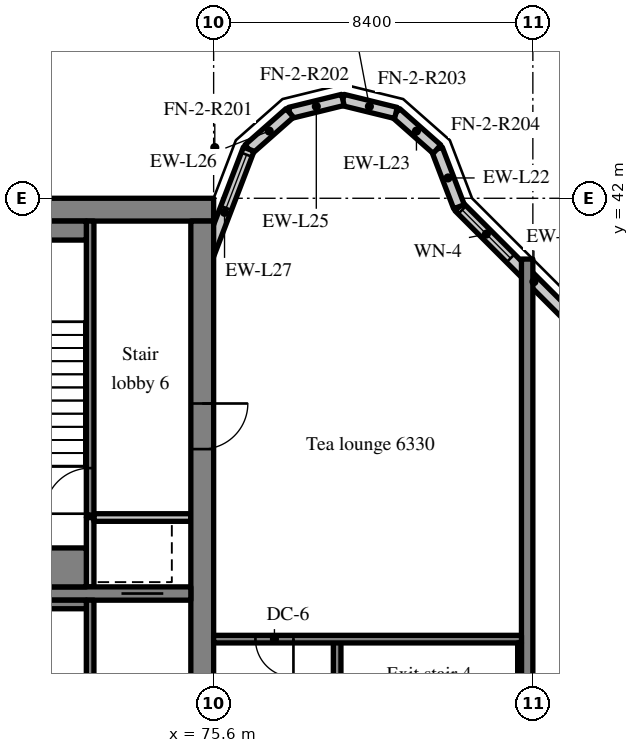
"""IFC4 building model, lengths in metres.
Left out: names, types, materials, properties, quantities, classifications, styles, units other than length and angle.
Written with IfcOpenShell. Run it as: python <this file> out.ifc"""

import sys

from ifc_helpers import new_model, si_unit, direction, frame, frame_2d, origin, place, context, subcontext, project, spatial, rectangle, extrude, source, transform, mapped, element, fill, save


model = new_model("IFC4")
c1 = context("Model", 3, precision=1e-05, world=origin(), true_north=direction((0.0, 1.0)))
c2 = subcontext(c1, "Body", "Model", "MODEL_VIEW")
j1 = project(units=[si_unit("LENGTHUNIT", "METRE"), si_unit("PLANEANGLEUNIT", "RADIAN")], contexts=[c1])
p1 = place(None, origin())
s1 = spatial("IfcSite", under=j1, at=p1, CompositionType="ELEMENT")
p2 = place(p1, origin())
s2 = spatial("IfcBuilding", under=s1, at=p2, CompositionType="ELEMENT")
p3 = place(p2, frame((0.0, 0.0, 260.8)))
s3 = spatial("IfcBuildingStorey", under=s2, at=p3, CompositionType="ELEMENT", Elevation=260.8)
m1 = source(origin(), c2, "Body", "SweptSolid", [
    extrude(rectangle(XDim=50.4, YDim=0.6, at=frame_2d((25.2, 0.0))), origin(), (0.0, 0.0, 1.0), 3.62),
])
p4 = place(p3, frame((25.2, 41.7, 0.0), z_axis=(0.0, 0.0, 1.0), x_axis=(1.0, 0.0, 0.0)))
e1 = element("IfcWall", 1, at=p4, inside=s3, PredefinedType="SHEAR", context=c2, shape_type="MappedRepresentation", body=[
    mapped(m1, transform((0.0, 0.0, 0.0), scale=1.0)),
])
m2 = source(origin(), c2, "Body", "SweptSolid", [
    extrude(rectangle(XDim=18.8, YDim=0.6, at=frame_2d((9.4, 0.0))), origin(), (0.0, 0.0, 1.0), 3.62),
])
p5 = place(p3, frame((75.3, 22.6, 0.0), z_axis=(0.0, 0.0, 1.0), x_axis=(0.0, 1.0, 0.0)))
e2 = element("IfcWall", 2, at=p5, inside=s3, PredefinedType="SHEAR", context=c2, shape_type="MappedRepresentation", body=[
    mapped(m2, transform((0.0, 0.0, 0.0), scale=1.0)),
])
m3 = source(origin(), c2, "Body", "SweptSolid", [
    extrude(rectangle(XDim=1.2, YDim=2.1, at=frame_2d((0.6, 1.05))), frame((0.0, 0.31, 0.0), z_axis=(0.0, -1.0, 0.0), x_axis=(1.0, 0.0, 0.0)), (0.0, 0.0, 1.0), 0.62),
])
p6 = place(p5, frame((12.8, 0.0, 0.0)))
e3 = element("IfcOpeningElement", 3, at=p6, cuts=e2, PredefinedType="OPENING", context=c2, shape_type="MappedRepresentation", body=[
    mapped(m3, transform((0.0, 0.0, 0.0), scale=1.0)),
])
m4 = source(origin(), c2, "Body", "SweptSolid", [
    extrude(rectangle(XDim=7.625, YDim=0.35, at=frame_2d((3.812, 0.0))), origin(), (0.0, 0.0, 1.0), 3.62),
])
p7 = place(p3, frame((67.375, 31.6, 0.0), z_axis=(0.0, 0.0, 1.0), x_axis=(1.0, 0.0, 0.0)))
e4 = element("IfcWall", 4, at=p7, inside=s3, PredefinedType="SHEAR", context=c2, shape_type="MappedRepresentation", body=[
    mapped(m4, transform((0.0, 0.0, 0.0), scale=1.0)),
])
m5 = source(origin(), c2, "Body", "SweptSolid", [
    extrude(rectangle(XDim=1.1, YDim=2.1, at=frame_2d((0.55, 1.05))), frame((0.0, 0.185, 0.0), z_axis=(0.0, -1.0, 0.0), x_axis=(1.0, 0.0, 0.0)), (0.0, 0.0, 1.0), 0.37),
])
p8 = place(p7, frame((5.8, 0.0, 0.0)))
e5 = element("IfcOpeningElement", 5, at=p8, cuts=e4, PredefinedType="OPENING", context=c2, shape_type="MappedRepresentation", body=[
    mapped(m5, transform((0.0, 0.0, 0.0), scale=1.0)),
])
m6 = source(origin(), c2, "Body", "SweptSolid", [
    extrude(rectangle(XDim=18.4, YDim=0.3, at=frame_2d((9.2, 0.0))), origin(), (0.0, 0.0, 1.0), 3.62),
])
p9 = place(p3, frame((83.85, 22.0, 0.0), z_axis=(0.0, 0.0, 1.0), x_axis=(0.0, 1.0, 0.0)))
e6 = element("IfcWall", 6, at=p9, inside=s3, PredefinedType="SHEAR", context=c2, shape_type="MappedRepresentation", body=[
    mapped(m6, transform((0.0, 0.0, 0.0), scale=1.0)),
])
m7 = source(origin(), c2, "Body", "SweptSolid", [
    extrude(rectangle(XDim=5.576, YDim=0.3, at=frame_2d((2.788, 0.0))), origin(), (0.0, 0.0, 1.0), 3.62),
])
p10 = place(p3, frame((86.0, 37.834, 0.0), z_axis=(0.0, 0.0, 1.0), x_axis=(-0.707106781187, 0.707106781187, 0.0)))
e7 = element("IfcWall", 7, at=p10, inside=s3, PredefinedType="SOLIDWALL", context=c2, shape_type="MappedRepresentation", body=[
    mapped(m7, transform((0.0, 0.0, 0.0), scale=1.0)),
])
m8 = source(origin(), c2, "Body", "SweptSolid", [
    extrude(rectangle(XDim=1.8, YDim=1.5, at=frame_2d((0.9, 0.75))), frame((0.0, 0.16, 0.0), z_axis=(0.0, -1.0, 0.0), x_axis=(1.0, 0.0, 0.0)), (0.0, 0.0, 1.0), 0.32),
])
p11 = place(p10, frame((3.658, 0.0, 0.9)))
e8 = element("IfcOpeningElement", 8, at=p11, cuts=e7, PredefinedType="OPENING", context=c2, shape_type="MappedRepresentation", body=[
    mapped(m8, transform((0.0, 0.0, 0.0), scale=1.0)),
])
m9 = source(origin(), c2, "Body", "SweptSolid", [
    extrude(rectangle(XDim=1.622, YDim=0.3, at=frame_2d((0.811, 0.0))), origin(), (0.0, 0.0, 1.0), 3.62),
])
p12 = place(p3, frame((82.057, 41.777, 0.0), z_axis=(0.0, 0.0, 1.0), x_axis=(-0.357778527068, 0.933806471154, 0.0)))
e9 = element("IfcWall", 9, at=p12, inside=s3, PredefinedType="SOLIDWALL", context=c2, shape_type="MappedRepresentation", body=[
    mapped(m9, transform((0.0, 0.0, 0.0), scale=1.0)),
])
m10 = source(origin(), c2, "Body", "SweptSolid", [
    extrude(rectangle(XDim=1.44, YDim=0.3, at=frame_2d((0.72, 0.0))), origin(), (0.0, 0.0, 1.0), 3.62),
])
p13 = place(p3, frame((81.477, 43.292, 0.0), z_axis=(0.0, 0.0, 1.0), x_axis=(-0.74957555648, 0.661918790432, 0.0)))
e10 = element("IfcWall", 10, at=p13, inside=s3, PredefinedType="SOLIDWALL", context=c2, shape_type="MappedRepresentation", body=[
    mapped(m10, transform((0.0, 0.0, 0.0), scale=1.0)),
])
m11 = source(origin(), c2, "Body", "SweptSolid", [
    extrude(rectangle(XDim=1.439, YDim=0.3, at=frame_2d((0.719, 0.0))), origin(), (0.0, 0.0, 1.0), 3.62),
])
for number, where, z_axis, x_axis in (
    (11, (80.397, 44.245, 0.0), (0.0, 0.0, 1.0), (-0.971, 0.238, 0.0)),
    (12, (79.0, 44.588, 0.0), (0.0, 0.0, 1.0), (-0.971, -0.238, 0.0)),
):
    element("IfcWall", number, at=place(p3, frame(where, z_axis=z_axis, x_axis=x_axis)), inside=s3, PredefinedType="SOLIDWALL", context=c2, shape_type="MappedRepresentation", body=[
        mapped(m11, transform((0.0, 0.0, 0.0), scale=1.0)),
    ])
p14 = place(p3, frame((77.603, 44.245, 0.0), z_axis=(0.0, 0.0, 1.0), x_axis=(-0.74957555648, -0.661918790432, 0.0)))
e13 = element("IfcWall", 13, at=p14, inside=s3, PredefinedType="SOLIDWALL", context=c2, shape_type="MappedRepresentation", body=[
    mapped(m10, transform((0.0, 0.0, 0.0), scale=1.0)),
])
m12 = source(origin(), c2, "Body", "SweptSolid", [
    extrude(rectangle(XDim=3.559, YDim=0.3, at=frame_2d((1.78, 0.0))), origin(), (0.0, 0.0, 1.0), 3.62),
])
p15 = place(p3, frame((76.523, 43.292, 0.0), z_axis=(0.0, 0.0, 1.0), x_axis=(-0.35779745313, -0.933799219604, 0.0)))
e14 = element("IfcWall", 14, at=p15, inside=s3, PredefinedType="SOLIDWALL", context=c2, shape_type="MappedRepresentation", body=[
    mapped(m12, transform((0.0, 0.0, 0.0), scale=1.0)),
])
m13 = source(origin(), c2, "Body", "SweptSolid", [
    extrude(rectangle(XDim=1.5, YDim=2.0, at=frame_2d((0.75, 1.0))), frame((0.0, 0.16, 0.0), z_axis=(0.0, -1.0, 0.0), x_axis=(1.0, 0.0, 0.0)), (0.0, 0.0, 1.0), 0.32),
])
p16 = place(p15, frame((0.156, 0.0, 0.9)))
e15 = element("IfcOpeningElement", 15, at=p16, cuts=e14, PredefinedType="OPENING", context=c2, shape_type="MappedRepresentation", body=[
    mapped(m13, transform((0.0, 0.0, 0.0), scale=1.0)),
])
m14 = source(origin(), c2, "Body", "SweptSolid", [
    extrude(rectangle(XDim=8.825, YDim=0.2, at=frame_2d((4.413, 0.0))), origin(), (0.0, 0.0, 1.0), 3.62),
])
p17 = place(p3, frame((72.35, 22.6, 0.0), z_axis=(0.0, 0.0, 1.0), x_axis=(0.0, 1.0, 0.0)))
e16 = element("IfcWall", 16, at=p17, inside=s3, PredefinedType="SOLIDWALL", context=c2, shape_type="MappedRepresentation", body=[
    mapped(m14, transform((0.0, 0.0, 0.0), scale=1.0)),
])
m15 = source(origin(), c2, "Body", "SweptSolid", [
    extrude(rectangle(XDim=1.2, YDim=2.1, at=frame_2d((0.6, 1.05))), frame((0.0, 0.11, 0.0), z_axis=(0.0, -1.0, 0.0), x_axis=(1.0, 0.0, 0.0)), (0.0, 0.0, 1.0), 0.22),
])
p18 = place(p17, frame((1.0, 0.0, 0.0)))
e17 = element("IfcOpeningElement", 17, at=p18, cuts=e16, PredefinedType="OPENING", context=c2, shape_type="MappedRepresentation", body=[
    mapped(m15, transform((0.0, 0.0, 0.0), scale=1.0)),
])
m16 = source(origin(), c2, "Body", "SweptSolid", [
    extrude(rectangle(XDim=1.825, YDim=0.2, at=frame_2d((0.913, 0.0))), origin(), (0.0, 0.0, 1.0), 3.62),
])
p19 = place(p3, frame((72.35, 31.775, 0.0), z_axis=(0.0, 0.0, 1.0), x_axis=(0.0, 1.0, 0.0)))
e18 = element("IfcWall", 18, at=p19, inside=s3, PredefinedType="SOLIDWALL", context=c2, shape_type="MappedRepresentation", body=[
    mapped(m16, transform((0.0, 0.0, 0.0), scale=1.0)),
])
m17 = source(origin(), c2, "Body", "SweptSolid", [
    extrude(rectangle(XDim=2.55, YDim=0.2, at=frame_2d((1.275, 0.0))), origin(), (0.0, 0.0, 1.0), 3.62),
])
p20 = place(p3, frame((72.45, 33.6, 0.0), z_axis=(0.0, 0.0, 1.0), x_axis=(1.0, 0.0, 0.0)))
e19 = element("IfcWall", 19, at=p20, inside=s3, PredefinedType="SOLIDWALL", context=c2, shape_type="MappedRepresentation", body=[
    mapped(m17, transform((0.0, 0.0, 0.0), scale=1.0)),
])
m18 = source(origin(), c2, "Body", "SweptSolid", [
    extrude(rectangle(XDim=7.8, YDim=0.2, at=frame_2d((3.9, 0.0))), origin(), (0.0, 0.0, 1.0), 3.62),
])
p21 = place(p3, frame((72.35, 33.6, 0.0), z_axis=(0.0, 0.0, 1.0), x_axis=(0.0, 1.0, 0.0)))
e20 = element("IfcWall", 20, at=p21, inside=s3, PredefinedType="SOLIDWALL", context=c2, shape_type="MappedRepresentation", body=[
    mapped(m18, transform((0.0, 0.0, 0.0), scale=1.0)),
])
p22 = place(p21, frame((0.1, 0.0, 0.0)))
e21 = element("IfcOpeningElement", 21, at=p22, cuts=e20, PredefinedType="OPENING", context=c2, shape_type="MappedRepresentation", body=[
    mapped(m15, transform((0.0, 0.0, 0.0), scale=1.0)),
])
m19 = source(origin(), c2, "Body", "SweptSolid", [
    extrude(rectangle(XDim=8.3, YDim=0.2, at=frame_2d((4.15, 0.0))), origin(), (0.0, 0.0, 1.0), 3.62),
])
p23 = place(p3, frame((78.85, 22.1, 0.0), z_axis=(0.0, 0.0, 1.0), x_axis=(0.0, 1.0, 0.0)))
e22 = element("IfcWall", 22, at=p23, inside=s3, PredefinedType="SOLIDWALL", context=c2, shape_type="MappedRepresentation", body=[
    mapped(m19, transform((0.0, 0.0, 0.0), scale=1.0)),
])
p24 = place(p23, frame((0.6, 0.0, 0.0)))
e23 = element("IfcOpeningElement", 23, at=p24, cuts=e22, PredefinedType="OPENING", context=c2, shape_type="MappedRepresentation", body=[
    mapped(m15, transform((0.0, 0.0, 0.0), scale=1.0)),
])
m20 = source(origin(), c2, "Body", "SweptSolid", [
    extrude(rectangle(XDim=8.1, YDim=0.2, at=frame_2d((4.05, 0.0))), origin(), (0.0, 0.0, 1.0), 3.62),
])
p25 = place(p3, frame((83.7, 30.4, 0.0), z_axis=(0.0, 0.0, 1.0), x_axis=(-1.0, 0.0, 0.0)))
e24 = element("IfcWall", 24, at=p25, inside=s3, PredefinedType="SOLIDWALL", context=c2, shape_type="MappedRepresentation", body=[
    mapped(m20, transform((0.0, 0.0, 0.0), scale=1.0)),
])
m21 = source(origin(), c2, "Body", "SweptSolid", [
    extrude(rectangle(XDim=1.0, YDim=2.1, at=frame_2d((0.5, 1.05))), frame((0.0, 0.11, 0.0), z_axis=(0.0, -1.0, 0.0), x_axis=(1.0, 0.0, 0.0)), (0.0, 0.0, 1.0), 0.22),
])
p26 = place(p25, frame((6.0, 0.0, 0.0)))
e25 = element("IfcOpeningElement", 25, at=p26, cuts=e24, PredefinedType="OPENING", context=c2, shape_type="MappedRepresentation", body=[
    mapped(m21, transform((0.0, 0.0, 0.0), scale=1.0)),
])
m22 = source(origin(), c2, "Body", "SweptSolid", [
    extrude(rectangle(XDim=4.875, YDim=0.225, at=frame_2d((2.438, 0.0))), origin(), (0.0, 0.0, 1.0), 3.62),
])
p27 = place(p3, frame((67.375, 31.312, 0.0), z_axis=(0.0, 0.0, 1.0), x_axis=(1.0, 0.0, 0.0)))
e26 = element("IfcWall", 26, at=p27, inside=s3, PredefinedType="SOLIDWALL", context=c2, shape_type="MappedRepresentation", body=[
    mapped(m22, transform((0.0, 0.0, 0.0), scale=1.0)),
])
m23 = source(origin(), c2, "Body", "SweptSolid", [
    extrude(rectangle(XDim=4.875, YDim=0.5, at=frame_2d((2.438, 0.0))), origin(), (0.0, 0.0, 1.0), 3.62),
])
p28 = place(p3, frame((67.375, 41.15, 0.0), z_axis=(0.0, 0.0, 1.0), x_axis=(1.0, 0.0, 0.0)))
e27 = element("IfcWall", 27, at=p28, inside=s3, PredefinedType="SOLIDWALL", context=c2, shape_type="MappedRepresentation", body=[
    mapped(m23, transform((0.0, 0.0, 0.0), scale=1.0)),
])
m24 = source(origin(), c2, "Body", "SweptSolid", [
    extrude(rectangle(XDim=4.875, YDim=1.025, at=frame_2d((2.438, 0.0))), origin(), (0.0, 0.0, 1.0), 3.62),
])
p29 = place(p3, frame((67.375, 32.287, 0.0), z_axis=(0.0, 0.0, 1.0), x_axis=(1.0, 0.0, 0.0)))
e28 = element("IfcWall", 28, at=p29, inside=s3, PredefinedType="SOLIDWALL", context=c2, shape_type="MappedRepresentation", body=[
    mapped(m24, transform((0.0, 0.0, 0.0), scale=1.0)),
])
m25 = source(origin(), c2, "Body", "SweptSolid", [
    extrude(rectangle(XDim=8.1, YDim=0.1, at=frame_2d((4.05, 0.0))), origin(), (0.0, 0.0, 1.0), 3.62),
])
p30 = place(p3, frame((83.65, 22.2, 0.0), z_axis=(0.0, 0.0, 1.0), x_axis=(0.0, 1.0, 0.0)))
e29 = element("IfcWall", 29, at=p30, inside=s3, PredefinedType="SOLIDWALL", context=c2, shape_type="MappedRepresentation", body=[
    mapped(m25, transform((0.0, 0.0, 0.0), scale=1.0)),
])
m26 = source(origin(), c2, "Body", "SweptSolid", [
    extrude(rectangle(XDim=1.8, YDim=1.5, at=frame_2d((0.9, 0.75))), frame((0.0, 0.03, 0.0), z_axis=(0.0, -1.0, 0.0), x_axis=(1.0, 0.0, 0.0)), (0.0, 0.0, 1.0), 0.06),
])
p31 = place(p11, origin())
e30 = element("IfcWindow", 30, at=p31, inside=s3, PartitioningType="SINGLE_PANEL", PredefinedType="WINDOW", context=c2, shape_type="MappedRepresentation", body=[
    mapped(m26, transform((0.0, 0.0, 0.0), scale=1.0)),
])
fill(e8, e30)
m27 = source(origin(), c2, "Body", "SweptSolid", [
    extrude(rectangle(XDim=1.5, YDim=2.0, at=frame_2d((0.75, 1.0))), frame((0.0, 0.03, 0.0), z_axis=(0.0, -1.0, 0.0), x_axis=(1.0, 0.0, 0.0)), (0.0, 0.0, 1.0), 0.06),
])
p32 = place(p16, origin())
e31 = element("IfcWindow", 31, at=p32, inside=s3, PartitioningType="SINGLE_PANEL", PredefinedType="WINDOW", context=c2, shape_type="MappedRepresentation", body=[
    mapped(m27, transform((0.0, 0.0, 0.0), scale=1.0)),
])
fill(e15, e31)
m28 = source(origin(), c2, "Body", "SweptSolid", [
    extrude(rectangle(XDim=1.1, YDim=2.1, at=frame_2d((0.55, 1.05))), frame((0.0, 0.025, 0.0), z_axis=(0.0, -1.0, 0.0), x_axis=(1.0, 0.0, 0.0)), (0.0, 0.0, 1.0), 0.05),
])
p33 = place(p8, origin())
e32 = element("IfcDoor", 32, at=p33, inside=s3, OperationType="SLIDING_TO_LEFT", PredefinedType="DOOR", context=c2, shape_type="MappedRepresentation", body=[
    mapped(m28, transform((0.0, 0.0, 0.0), scale=1.0)),
])
fill(e5, e32)
m29 = source(origin(), c2, "Body", "SweptSolid", [
    extrude(rectangle(XDim=1.2, YDim=2.1, at=frame_2d((0.6, 1.05))), frame((0.0, 0.025, 0.0), z_axis=(0.0, -1.0, 0.0), x_axis=(1.0, 0.0, 0.0)), (0.0, 0.0, 1.0), 0.05),
])
p34 = place(p22, origin())
e33 = element("IfcDoor", 33, at=p34, inside=s3, OperationType="SINGLE_SWING_LEFT", PredefinedType="DOOR", context=c2, shape_type="MappedRepresentation", body=[
    mapped(m29, transform((0.0, 0.0, 0.0), scale=1.0)),
])
fill(e21, e33)
p35 = place(p6, origin())
e34 = element("IfcDoor", 34, at=p35, inside=s3, OperationType="SINGLE_SWING_RIGHT", PredefinedType="DOOR", context=c2, shape_type="MappedRepresentation", body=[
    mapped(m29, transform((0.0, 0.0, 0.0), scale=1.0)),
])
fill(e3, e34)
m30 = source(origin(), c2, "Body", "SweptSolid", [
    extrude(rectangle(XDim=1.0, YDim=2.1, at=frame_2d((0.5, 1.05))), frame((0.0, 0.025, 0.0), z_axis=(0.0, -1.0, 0.0), x_axis=(1.0, 0.0, 0.0)), (0.0, 0.0, 1.0), 0.05),
])
p36 = place(p26, origin())
e35 = element("IfcDoor", 35, at=p36, inside=s3, OperationType="SINGLE_SWING_LEFT", PredefinedType="DOOR", context=c2, shape_type="MappedRepresentation", body=[
    mapped(m30, transform((0.0, 0.0, 0.0), scale=1.0)),
])
fill(e25, e35)
save(model, sys.argv[1])
